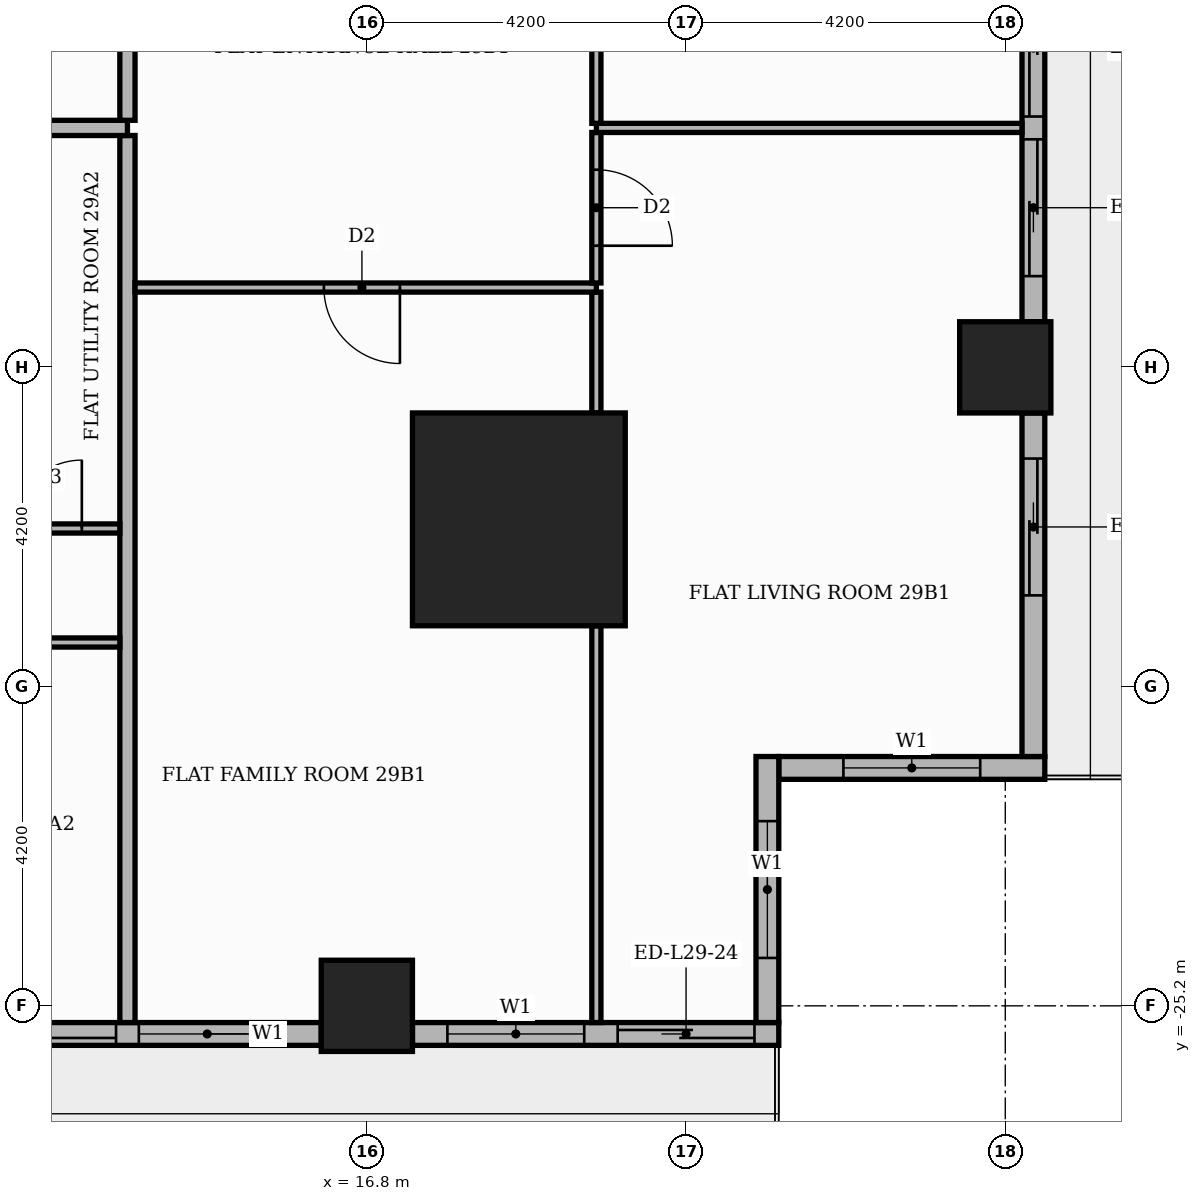
"""IFC4 building model, lengths in metres.
Left out: names, types, materials, properties, quantities, classifications, styles, units other than length and angle.
Written with IfcOpenShell. Run it as: python <this file> out.ifc"""

import sys

from ifc_helpers import new_model, si_unit, direction, frame, frame_2d, origin, origin_2d, place, context, subcontext, project, spatial, rectangle, extrude, element, fill, save


model = new_model("IFC4")
c1 = context("Model", 3, precision=1e-05, world=origin(), true_north=direction((0.0, 1.0)))
c2 = subcontext(c1, "Body", "Model", "MODEL_VIEW")
j1 = project(units=[si_unit("LENGTHUNIT", "METRE"), si_unit("PLANEANGLEUNIT", "RADIAN")], contexts=[c1])
p1 = place(None, origin())
s1 = spatial("IfcSite", under=j1, at=p1, CompositionType="ELEMENT")
p2 = place(p1, origin())
s2 = spatial("IfcBuilding", under=s1, at=p2, CompositionType="ELEMENT")
p3 = place(p2, frame((0.0, 0.0, 122.1)))
s3 = spatial("IfcBuildingStorey", under=s2, at=p3, CompositionType="ELEMENT", Elevation=122.1)
p4 = place(p3, frame((18.8, -18.8, 0.0), z_axis=(0.0, 0.0, 1.0), x_axis=(1.0, 0.0, 0.0)))
e1 = element("IfcColumn", 1, at=p4, inside=s3, PredefinedType="COLUMN", context=c2, shape_type="SweptSolid", body=[
    extrude(rectangle(XDim=2.8, YDim=2.8, at=origin_2d()), origin(), (0.0, 0.0, 1.0), 3.9),
])
for number, where, z_axis, x_axis in (
    (2, (25.2, -16.8, 0.0), (0.0, 0.0, 1.0), (1.0, 0.0, 0.0)),
    (3, (16.8, -25.2, 0.0), (0.0, 0.0, 1.0), (1.0, 0.0, 0.0)),
):
    element("IfcColumn", number, at=place(p3, frame(where, z_axis=z_axis, x_axis=x_axis)), inside=s3, PredefinedType="COLUMN", context=c2, shape_type="SweptSolid", body=[
        extrude(rectangle(XDim=1.2, YDim=1.2, at=origin_2d()), origin(), (0.0, 0.0, 1.0), 3.9),
    ])
p5 = place(p3, frame((22.22, -22.07, 0.0), z_axis=(0.0, 0.0, 1.0), x_axis=(1.0, 0.0, 0.0)))
e4 = element("IfcWall", 4, at=p5, inside=s3, PredefinedType="STANDARD", context=c2, shape_type="SweptSolid", body=[
    extrude(rectangle(XDim=3.5, YDim=0.3, at=frame_2d((1.75, 0.0))), origin(), (0.0, 0.0, 1.0), 3.4),
])
p6 = place(p5, frame((0.85, 0.0, 0.9)))
e5 = element("IfcOpeningElement", 5, at=p6, cuts=e4, PredefinedType="OPENING", context=c2, shape_type="SweptSolid", body=[
    extrude(rectangle(XDim=1.8, YDim=2.1, at=frame_2d((0.9, 1.05))), frame((0.0, 0.16, 0.0), z_axis=(0.0, -1.0, 0.0), x_axis=(1.0, 0.0, 0.0)), (0.0, 0.0, 1.0), 0.32),
])
p7 = place(p3, frame((25.57, -21.92, 0.0), z_axis=(0.0, 0.0, 1.0), x_axis=(0.0, 1.0, 0.0)))
e6 = element("IfcWall", 6, at=p7, inside=s3, PredefinedType="STANDARD", context=c2, shape_type="SweptSolid", body=[
    extrude(rectangle(XDim=4.52, YDim=0.3, at=frame_2d((2.26, 0.0))), origin(), (0.0, 0.0, 1.0), 3.4),
])
p8 = place(p7, frame((2.12, 0.0, 0.0)))
e7 = element("IfcOpeningElement", 7, at=p8, cuts=e6, PredefinedType="OPENING", context=c2, shape_type="SweptSolid", body=[
    extrude(rectangle(XDim=1.8, YDim=2.4, at=frame_2d((0.9, 1.2))), frame((0.0, 0.16, 0.0), z_axis=(0.0, -1.0, 0.0), x_axis=(1.0, 0.0, 0.0)), (0.0, 0.0, 1.0), 0.32),
])
p9 = place(p3, frame((25.57, -16.2, 0.0), z_axis=(0.0, 0.0, 1.0), x_axis=(0.0, 1.0, 0.0)))
e8 = element("IfcWall", 8, at=p9, inside=s3, PredefinedType="STANDARD", context=c2, shape_type="SweptSolid", body=[
    extrude(rectangle(XDim=7.2, YDim=0.3, at=frame_2d((3.6, 0.0))), origin(), (0.0, 0.0, 1.0), 3.4),
])
p10 = place(p9, frame((0.6, 0.0, 0.0)))
e9 = element("IfcOpeningElement", 9, at=p10, cuts=e8, PredefinedType="OPENING", context=c2, shape_type="SweptSolid", body=[
    extrude(rectangle(XDim=1.8, YDim=2.4, at=frame_2d((0.9, 1.2))), frame((0.0, 0.16, 0.0), z_axis=(0.0, -1.0, 0.0), x_axis=(1.0, 0.0, 0.0)), (0.0, 0.0, 1.0), 0.32),
])
p11 = place(p9, frame((2.7, 0.0, 0.0)))
e10 = element("IfcOpeningElement", 10, at=p11, cuts=e8, PredefinedType="OPENING", context=c2, shape_type="SweptSolid", body=[
    extrude(rectangle(XDim=1.8, YDim=2.4, at=frame_2d((0.9, 1.2))), frame((0.0, 0.16, 0.0), z_axis=(0.0, -1.0, 0.0), x_axis=(1.0, 0.0, 0.0)), (0.0, 0.0, 1.0), 0.32),
])
p12 = place(p9, frame((4.8, 0.0, 0.9)))
e11 = element("IfcOpeningElement", 11, at=p12, cuts=e8, PredefinedType="OPENING", context=c2, shape_type="SweptSolid", body=[
    extrude(rectangle(XDim=1.8, YDim=2.1, at=frame_2d((0.9, 1.05))), frame((0.0, 0.16, 0.0), z_axis=(0.0, -1.0, 0.0), x_axis=(1.0, 0.0, 0.0)), (0.0, 0.0, 1.0), 0.32),
])
p13 = place(p3, frame((9.0, -25.57, 0.0), z_axis=(0.0, 0.0, 1.0), x_axis=(1.0, 0.0, 0.0)))
e12 = element("IfcWall", 12, at=p13, inside=s3, PredefinedType="STANDARD", context=c2, shape_type="SweptSolid", body=[
    extrude(rectangle(XDim=7.2, YDim=0.3, at=frame_2d((3.6, 0.0))), origin(), (0.0, 0.0, 1.0), 3.4),
])
p14 = place(p13, frame((0.6, 0.0, 0.0)))
e13 = element("IfcOpeningElement", 13, at=p14, cuts=e12, PredefinedType="OPENING", context=c2, shape_type="SweptSolid", body=[
    extrude(rectangle(XDim=3.9, YDim=2.4, at=frame_2d((1.95, 1.2))), frame((0.0, 0.16, 0.0), z_axis=(0.0, -1.0, 0.0), x_axis=(1.0, 0.0, 0.0)), (0.0, 0.0, 1.0), 0.32),
])
p15 = place(p13, frame((4.8, 0.0, 0.9)))
e14 = element("IfcOpeningElement", 14, at=p15, cuts=e12, PredefinedType="OPENING", context=c2, shape_type="SweptSolid", body=[
    extrude(rectangle(XDim=1.8, YDim=2.1, at=frame_2d((0.9, 1.05))), frame((0.0, 0.16, 0.0), z_axis=(0.0, -1.0, 0.0), x_axis=(1.0, 0.0, 0.0)), (0.0, 0.0, 1.0), 0.32),
])
p16 = place(p3, frame((17.4, -25.57, 0.0), z_axis=(0.0, 0.0, 1.0), x_axis=(1.0, 0.0, 0.0)))
e15 = element("IfcWall", 15, at=p16, inside=s3, PredefinedType="STANDARD", context=c2, shape_type="SweptSolid", body=[
    extrude(rectangle(XDim=4.82, YDim=0.3, at=frame_2d((2.41, 0.0))), origin(), (0.0, 0.0, 1.0), 3.4),
])
p17 = place(p16, frame((2.7, 0.0, 0.0)))
e16 = element("IfcOpeningElement", 16, at=p17, cuts=e15, PredefinedType="OPENING", context=c2, shape_type="SweptSolid", body=[
    extrude(rectangle(XDim=1.8, YDim=2.4, at=frame_2d((0.9, 1.2))), frame((0.0, 0.16, 0.0), z_axis=(0.0, -1.0, 0.0), x_axis=(1.0, 0.0, 0.0)), (0.0, 0.0, 1.0), 0.32),
])
p18 = place(p16, frame((0.46, 0.0, 0.9)))
e17 = element("IfcOpeningElement", 17, at=p18, cuts=e15, PredefinedType="OPENING", context=c2, shape_type="SweptSolid", body=[
    extrude(rectangle(XDim=1.8, YDim=2.1, at=frame_2d((0.9, 1.05))), frame((0.0, 0.16, 0.0), z_axis=(0.0, -1.0, 0.0), x_axis=(1.0, 0.0, 0.0)), (0.0, 0.0, 1.0), 0.32),
])
p19 = place(p3, frame((22.07, -25.42, 0.0), z_axis=(0.0, 0.0, 1.0), x_axis=(0.0, 1.0, 0.0)))
e18 = element("IfcWall", 18, at=p19, inside=s3, PredefinedType="STANDARD", context=c2, shape_type="SweptSolid", body=[
    extrude(rectangle(XDim=3.5, YDim=0.3, at=frame_2d((1.75, 0.0))), origin(), (0.0, 0.0, 1.0), 3.4),
])
p20 = place(p19, frame((0.85, 0.0, 0.9)))
e19 = element("IfcOpeningElement", 19, at=p20, cuts=e18, PredefinedType="OPENING", context=c2, shape_type="SweptSolid", body=[
    extrude(rectangle(XDim=1.8, YDim=2.1, at=frame_2d((0.9, 1.05))), frame((0.0, 0.16, 0.0), z_axis=(0.0, -1.0, 0.0), x_axis=(1.0, 0.0, 0.0)), (0.0, 0.0, 1.0), 0.32),
])
p21 = place(p3, frame((13.65, -25.42, 0.0), z_axis=(0.0, 0.0, 1.0), x_axis=(0.0, 1.0, 0.0)))
e20 = element("IfcWall", 20, at=p21, inside=s3, PredefinedType="PARTITIONING", context=c2, shape_type="SweptSolid", body=[
    extrude(rectangle(XDim=11.67, YDim=0.2, at=frame_2d((5.835, 0.0))), origin(), (0.0, 0.0, 1.0), 3.4),
])
p22 = place(p3, frame((19.82, -25.42, 0.0), z_axis=(0.0, 0.0, 1.0), x_axis=(0.0, 1.0, 0.0)))
e21 = element("IfcWall", 21, at=p22, inside=s3, PredefinedType="PARTITIONING", context=c2, shape_type="SweptSolid", body=[
    extrude(rectangle(XDim=5.22, YDim=0.12, at=frame_2d((2.61, 0.0))), origin(), (0.0, 0.0, 1.0), 3.4),
])
p23 = place(p3, frame((-5.15, -20.42, 0.0), z_axis=(0.0, 0.0, 1.0), x_axis=(1.0, 0.0, 0.0)))
e22 = element("IfcWall", 22, at=p23, inside=s3, PredefinedType="PARTITIONING", context=c2, shape_type="SweptSolid", body=[
    extrude(rectangle(XDim=18.7, YDim=0.12, at=frame_2d((9.35, 0.0))), origin(), (0.0, 0.0, 1.0), 3.4),
])
p24 = place(p23, frame((3.65, 0.0, 0.0)))
e23 = element("IfcOpeningElement", 23, at=p24, cuts=e22, PredefinedType="OPENING", context=c2, shape_type="SweptSolid", body=[
    extrude(rectangle(XDim=0.9, YDim=2.1, at=frame_2d((0.45, 1.05))), frame((0.0, 0.07, 0.0), z_axis=(0.0, -1.0, 0.0), x_axis=(1.0, 0.0, 0.0)), (0.0, 0.0, 1.0), 0.14),
])
p25 = place(p23, frame((15.15, 0.0, 0.0)))
e24 = element("IfcOpeningElement", 24, at=p25, cuts=e22, PredefinedType="OPENING", context=c2, shape_type="SweptSolid", body=[
    extrude(rectangle(XDim=1.0, YDim=2.1, at=frame_2d((0.5, 1.05))), frame((0.0, 0.07, 0.0), z_axis=(0.0, -1.0, 0.0), x_axis=(1.0, 0.0, 0.0)), (0.0, 0.0, 1.0), 0.14),
])
p26 = place(p3, frame((-1.05, -18.92, 0.0), z_axis=(0.0, 0.0, 1.0), x_axis=(1.0, 0.0, 0.0)))
e25 = element("IfcWall", 25, at=p26, inside=s3, PredefinedType="PARTITIONING", context=c2, shape_type="SweptSolid", body=[
    extrude(rectangle(XDim=14.6, YDim=0.12, at=frame_2d((7.3, 0.0))), origin(), (0.0, 0.0, 1.0), 3.4),
])
p27 = place(p26, frame((2.55, 0.0, 0.0)))
e26 = element("IfcOpeningElement", 26, at=p27, cuts=e25, PredefinedType="OPENING", context=c2, shape_type="SweptSolid", body=[
    extrude(rectangle(XDim=0.9, YDim=2.1, at=frame_2d((0.45, 1.05))), frame((0.0, 0.07, 0.0), z_axis=(0.0, -1.0, 0.0), x_axis=(1.0, 0.0, 0.0)), (0.0, 0.0, 1.0), 0.14),
])
p28 = place(p26, frame((6.75, 0.0, 0.0)))
e27 = element("IfcOpeningElement", 27, at=p28, cuts=e25, PredefinedType="OPENING", context=c2, shape_type="SweptSolid", body=[
    extrude(rectangle(XDim=0.9, YDim=2.1, at=frame_2d((0.45, 1.05))), frame((0.0, 0.07, 0.0), z_axis=(0.0, -1.0, 0.0), x_axis=(1.0, 0.0, 0.0)), (0.0, 0.0, 1.0), 0.14),
])
p29 = place(p26, frame((10.05, 0.0, 0.0)))
e28 = element("IfcOpeningElement", 28, at=p29, cuts=e25, PredefinedType="OPENING", context=c2, shape_type="SweptSolid", body=[
    extrude(rectangle(XDim=0.9, YDim=2.1, at=frame_2d((0.45, 1.05))), frame((0.0, 0.07, 0.0), z_axis=(0.0, -1.0, 0.0), x_axis=(1.0, 0.0, 0.0)), (0.0, 0.0, 1.0), 0.14),
])
p30 = place(p26, frame((13.2, 0.0, 0.0)))
e29 = element("IfcOpeningElement", 29, at=p30, cuts=e25, PredefinedType="OPENING", context=c2, shape_type="SweptSolid", body=[
    extrude(rectangle(XDim=0.9, YDim=2.1, at=frame_2d((0.45, 1.05))), frame((0.0, 0.07, 0.0), z_axis=(0.0, -1.0, 0.0), x_axis=(1.0, 0.0, 0.0)), (0.0, 0.0, 1.0), 0.14),
])
p31 = place(p3, frame((19.82, -17.4, 0.0), z_axis=(0.0, 0.0, 1.0), x_axis=(0.0, 1.0, 0.0)))
e30 = element("IfcWall", 30, at=p31, inside=s3, PredefinedType="PARTITIONING", context=c2, shape_type="SweptSolid", body=[
    extrude(rectangle(XDim=1.59, YDim=0.12, at=frame_2d((0.795, 0.0))), origin(), (0.0, 0.0, 1.0), 3.4),
])
p32 = place(p3, frame((13.75, -15.75, 0.0), z_axis=(0.0, 0.0, 1.0), x_axis=(1.0, 0.0, 0.0)))
e31 = element("IfcWall", 31, at=p32, inside=s3, PredefinedType="PARTITIONING", context=c2, shape_type="SweptSolid", body=[
    extrude(rectangle(XDim=6.07, YDim=0.12, at=frame_2d((3.035, 0.0))), origin(), (0.0, 0.0, 1.0), 3.4),
])
p33 = place(p32, frame((2.485, 0.0, 0.0)))
e32 = element("IfcOpeningElement", 32, at=p33, cuts=e31, PredefinedType="OPENING", context=c2, shape_type="SweptSolid", body=[
    extrude(rectangle(XDim=1.0, YDim=2.1, at=frame_2d((0.5, 1.05))), frame((0.0, 0.07, 0.0), z_axis=(0.0, -1.0, 0.0), x_axis=(1.0, 0.0, 0.0)), (0.0, 0.0, 1.0), 0.14),
])
p34 = place(p3, frame((19.82, -15.69, 0.0), z_axis=(0.0, 0.0, 1.0), x_axis=(0.0, 1.0, 0.0)))
e33 = element("IfcWall", 33, at=p34, inside=s3, PredefinedType="PARTITIONING", context=c2, shape_type="SweptSolid", body=[
    extrude(rectangle(XDim=1.98, YDim=0.12, at=frame_2d((0.99, 0.0))), origin(), (0.0, 0.0, 1.0), 3.4),
])
p35 = place(p34, frame((0.49, 0.0, 0.0)))
e34 = element("IfcOpeningElement", 34, at=p35, cuts=e33, PredefinedType="OPENING", context=c2, shape_type="SweptSolid", body=[
    extrude(rectangle(XDim=1.0, YDim=2.1, at=frame_2d((0.5, 1.05))), frame((0.0, 0.07, 0.0), z_axis=(0.0, -1.0, 0.0), x_axis=(1.0, 0.0, 0.0)), (0.0, 0.0, 1.0), 0.14),
])
p36 = place(p3, frame((-20.42, -13.65, 0.0), z_axis=(0.0, 0.0, 1.0), x_axis=(1.0, 0.0, 0.0)))
e35 = element("IfcWall", 35, at=p36, inside=s3, PredefinedType="PARTITIONING", context=c2, shape_type="SweptSolid", body=[
    extrude(rectangle(XDim=34.07, YDim=0.2, at=frame_2d((17.035, 0.0))), origin(), (0.0, 0.0, 1.0), 3.4),
])
p37 = place(p36, frame((8.32, 0.0, 0.0)))
e36 = element("IfcOpeningElement", 36, at=p37, cuts=e35, PredefinedType="OPENING", context=c2, shape_type="SweptSolid", body=[
    extrude(rectangle(XDim=1.1, YDim=2.4, at=frame_2d((0.55, 1.2))), frame((0.0, 0.11, 0.0), z_axis=(0.0, -1.0, 0.0), x_axis=(1.0, 0.0, 0.0)), (0.0, 0.0, 1.0), 0.22),
])
p38 = place(p36, frame((16.72, 0.0, 0.0)))
e37 = element("IfcOpeningElement", 37, at=p38, cuts=e35, PredefinedType="OPENING", context=c2, shape_type="SweptSolid", body=[
    extrude(rectangle(XDim=1.1, YDim=2.4, at=frame_2d((0.55, 1.2))), frame((0.0, 0.11, 0.0), z_axis=(0.0, -1.0, 0.0), x_axis=(1.0, 0.0, 0.0)), (0.0, 0.0, 1.0), 0.22),
])
p39 = place(p3, frame((19.82, -13.65, 0.0), z_axis=(0.0, 0.0, 1.0), x_axis=(1.0, 0.0, 0.0)))
e38 = element("IfcWall", 38, at=p39, inside=s3, PredefinedType="PARTITIONING", context=c2, shape_type="SweptSolid", body=[
    extrude(rectangle(XDim=5.6, YDim=0.12, at=frame_2d((2.8, 0.0))), origin(), (0.0, 0.0, 1.0), 3.4),
])
p40 = place(p3, frame((19.82, -13.59, 0.0), z_axis=(0.0, 0.0, 1.0), x_axis=(0.0, 1.0, 0.0)))
e39 = element("IfcWall", 39, at=p40, inside=s3, PredefinedType="PARTITIONING", context=c2, shape_type="SweptSolid", body=[
    extrude(rectangle(XDim=4.08, YDim=0.12, at=frame_2d((2.04, 0.0))), origin(), (0.0, 0.0, 1.0), 3.4),
])
p41 = place(p40, frame((1.59, 0.0, 0.0)))
e40 = element("IfcOpeningElement", 40, at=p41, cuts=e39, PredefinedType="OPENING", context=c2, shape_type="SweptSolid", body=[
    extrude(rectangle(XDim=0.9, YDim=2.1, at=frame_2d((0.45, 1.05))), frame((0.0, 0.07, 0.0), z_axis=(0.0, -1.0, 0.0), x_axis=(1.0, 0.0, 0.0)), (0.0, 0.0, 1.0), 0.14),
])
p42 = place(p3, frame((13.65, -13.55, 0.0), z_axis=(0.0, 0.0, 1.0), x_axis=(0.0, 1.0, 0.0)))
e41 = element("IfcWall", 41, at=p42, inside=s3, PredefinedType="PARTITIONING", context=c2, shape_type="SweptSolid", body=[
    extrude(rectangle(XDim=8.2, YDim=0.2, at=frame_2d((4.1, 0.0))), origin(), (0.0, 0.0, 1.0), 3.4),
])
p43 = place(p42, frame((1.45, 0.0, 0.0)))
e42 = element("IfcOpeningElement", 42, at=p43, cuts=e41, PredefinedType="OPENING", context=c2, shape_type="SweptSolid", body=[
    extrude(rectangle(XDim=1.1, YDim=2.4, at=frame_2d((0.55, 1.2))), frame((0.0, 0.11, 0.0), z_axis=(0.0, -1.0, 0.0), x_axis=(1.0, 0.0, 0.0)), (0.0, 0.0, 1.0), 0.22),
])
p44 = place(p6, origin())
e43 = element("IfcWindow", 43, at=p44, inside=s3, PartitioningType="SINGLE_PANEL", PredefinedType="WINDOW", context=c2, shape_type="SweptSolid", body=[
    extrude(rectangle(XDim=1.8, YDim=2.1, at=frame_2d((0.9, 1.05))), frame((0.0, 0.03, 0.0), z_axis=(0.0, -1.0, 0.0), x_axis=(1.0, 0.0, 0.0)), (0.0, 0.0, 1.0), 0.06),
])
fill(e5, e43)
p45 = place(p8, origin())
e44 = element("IfcDoor", 44, at=p45, inside=s3, OperationType="SLIDING_TO_RIGHT", PredefinedType="DOOR", context=c2, shape_type="SweptSolid", body=[
    extrude(rectangle(XDim=1.8, YDim=2.4, at=frame_2d((0.9, 1.2))), frame((0.0, 0.025, 0.0), z_axis=(0.0, -1.0, 0.0), x_axis=(1.0, 0.0, 0.0)), (0.0, 0.0, 1.0), 0.05),
])
fill(e7, e44)
p46 = place(p10, origin())
e45 = element("IfcDoor", 45, at=p46, inside=s3, OperationType="SLIDING_TO_LEFT", PredefinedType="DOOR", context=c2, shape_type="SweptSolid", body=[
    extrude(rectangle(XDim=1.8, YDim=2.4, at=frame_2d((0.9, 1.2))), frame((0.0, 0.025, 0.0), z_axis=(0.0, -1.0, 0.0), x_axis=(1.0, 0.0, 0.0)), (0.0, 0.0, 1.0), 0.05),
])
fill(e9, e45)
p47 = place(p11, origin())
e46 = element("IfcDoor", 46, at=p47, inside=s3, OperationType="SLIDING_TO_RIGHT", PredefinedType="DOOR", context=c2, shape_type="SweptSolid", body=[
    extrude(rectangle(XDim=1.8, YDim=2.4, at=frame_2d((0.9, 1.2))), frame((0.0, 0.025, 0.0), z_axis=(0.0, -1.0, 0.0), x_axis=(1.0, 0.0, 0.0)), (0.0, 0.0, 1.0), 0.05),
])
fill(e10, e46)
p48 = place(p14, origin())
e47 = element("IfcDoor", 47, at=p48, inside=s3, OperationType="SLIDING_TO_LEFT", PredefinedType="DOOR", context=c2, shape_type="SweptSolid", body=[
    extrude(rectangle(XDim=3.9, YDim=2.4, at=frame_2d((1.95, 1.2))), frame((0.0, 0.025, 0.0), z_axis=(0.0, -1.0, 0.0), x_axis=(1.0, 0.0, 0.0)), (0.0, 0.0, 1.0), 0.05),
])
fill(e13, e47)
p49 = place(p15, origin())
e48 = element("IfcWindow", 48, at=p49, inside=s3, PartitioningType="SINGLE_PANEL", PredefinedType="WINDOW", context=c2, shape_type="SweptSolid", body=[
    extrude(rectangle(XDim=1.8, YDim=2.1, at=frame_2d((0.9, 1.05))), frame((0.0, 0.03, 0.0), z_axis=(0.0, -1.0, 0.0), x_axis=(1.0, 0.0, 0.0)), (0.0, 0.0, 1.0), 0.06),
])
fill(e14, e48)
p50 = place(p17, origin())
e49 = element("IfcDoor", 49, at=p50, inside=s3, OperationType="SLIDING_TO_LEFT", PredefinedType="DOOR", context=c2, shape_type="SweptSolid", body=[
    extrude(rectangle(XDim=1.8, YDim=2.4, at=frame_2d((0.9, 1.2))), frame((0.0, 0.025, 0.0), z_axis=(0.0, -1.0, 0.0), x_axis=(1.0, 0.0, 0.0)), (0.0, 0.0, 1.0), 0.05),
])
fill(e16, e49)
p51 = place(p18, origin())
e50 = element("IfcWindow", 50, at=p51, inside=s3, PartitioningType="SINGLE_PANEL", PredefinedType="WINDOW", context=c2, shape_type="SweptSolid", body=[
    extrude(rectangle(XDim=1.8, YDim=2.1, at=frame_2d((0.9, 1.05))), frame((0.0, 0.03, 0.0), z_axis=(0.0, -1.0, 0.0), x_axis=(1.0, 0.0, 0.0)), (0.0, 0.0, 1.0), 0.06),
])
fill(e17, e50)
p52 = place(p20, origin())
e51 = element("IfcWindow", 51, at=p52, inside=s3, PartitioningType="SINGLE_PANEL", PredefinedType="WINDOW", context=c2, shape_type="SweptSolid", body=[
    extrude(rectangle(XDim=1.8, YDim=2.1, at=frame_2d((0.9, 1.05))), frame((0.0, 0.03, 0.0), z_axis=(0.0, -1.0, 0.0), x_axis=(1.0, 0.0, 0.0)), (0.0, 0.0, 1.0), 0.06),
])
fill(e19, e51)
p53 = place(p30, origin())
e52 = element("IfcDoor", 52, at=p53, inside=s3, OperationType="SINGLE_SWING_RIGHT", PredefinedType="DOOR", context=c2, shape_type="SweptSolid", body=[
    extrude(rectangle(XDim=0.9, YDim=2.1, at=frame_2d((0.45, 1.05))), frame((0.0, 0.025, 0.0), z_axis=(0.0, -1.0, 0.0), x_axis=(1.0, 0.0, 0.0)), (0.0, 0.0, 1.0), 0.05),
])
fill(e29, e52)
p54 = place(p33, frame((1.0, 0.0, 0.0), z_axis=(0.0, 0.0, 1.0), x_axis=(-1.0, 0.0, 0.0)))
e53 = element("IfcDoor", 53, at=p54, inside=s3, OperationType="SINGLE_SWING_RIGHT", PredefinedType="DOOR", context=c2, shape_type="SweptSolid", body=[
    extrude(rectangle(XDim=1.0, YDim=2.1, at=frame_2d((0.5, 1.05))), frame((0.0, 0.025, 0.0), z_axis=(0.0, -1.0, 0.0), x_axis=(1.0, 0.0, 0.0)), (0.0, 0.0, 1.0), 0.05),
])
fill(e32, e53)
p55 = place(p35, frame((1.0, 0.0, 0.0), z_axis=(0.0, 0.0, 1.0), x_axis=(-1.0, 0.0, 0.0)))
e54 = element("IfcDoor", 54, at=p55, inside=s3, OperationType="SINGLE_SWING_LEFT", PredefinedType="DOOR", context=c2, shape_type="SweptSolid", body=[
    extrude(rectangle(XDim=1.0, YDim=2.1, at=frame_2d((0.5, 1.05))), frame((0.0, 0.025, 0.0), z_axis=(0.0, -1.0, 0.0), x_axis=(1.0, 0.0, 0.0)), (0.0, 0.0, 1.0), 0.05),
])
fill(e34, e54)
save(model, sys.argv[1])
